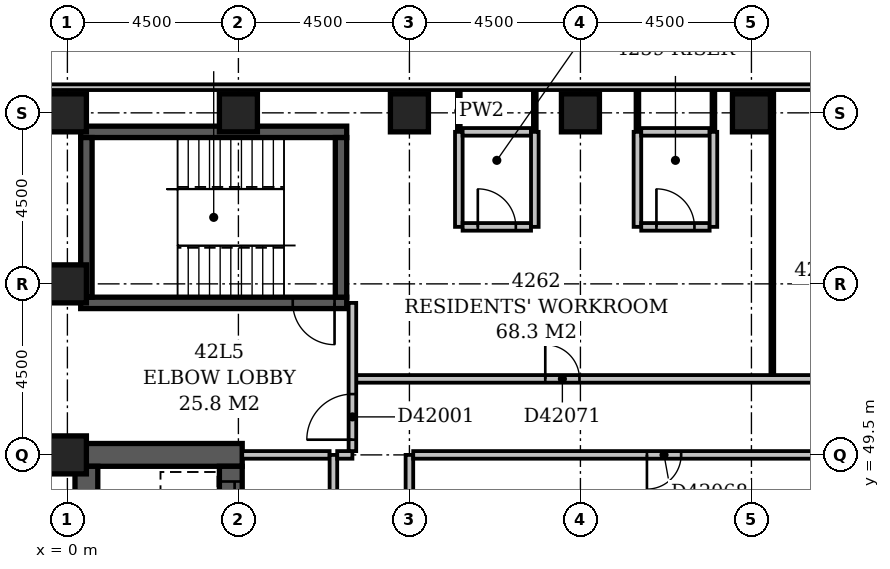
"""IFC4 building model, lengths in metres.
Left out: names, types, materials, properties, quantities, classifications, styles, units other than length and angle.
Written with IfcOpenShell. Run it as: python <this file> out.ifc"""

import sys

from ifc_helpers import new_model, si_unit, direction, frame, frame_2d, origin, origin_2d, place, context, subcontext, project, spatial, rectangle, extrude, element, fill, save


model = new_model("IFC4")
c1 = context("Model", 3, precision=1e-05, world=origin(), true_north=direction((0.0, 1.0)))
c2 = subcontext(c1, "Body", "Model", "MODEL_VIEW")
j1 = project(units=[si_unit("LENGTHUNIT", "METRE"), si_unit("PLANEANGLEUNIT", "RADIAN")], contexts=[c1])
p1 = place(None, origin())
s1 = spatial("IfcSite", under=j1, at=p1, CompositionType="ELEMENT")
p2 = place(p1, origin())
s2 = spatial("IfcBuilding", under=s1, at=p2, CompositionType="ELEMENT")
p3 = place(p2, frame((0.0, 0.0, 166.4)))
s3 = spatial("IfcBuildingStorey", under=s2, at=p3, CompositionType="ELEMENT", Elevation=166.4)
p4 = place(p3, frame((0.2, 49.5, -0.3), z_axis=(0.0, 0.0, 1.0), x_axis=(1.0, 0.0, 0.0)))
e1 = element("IfcWall", 1, at=p4, inside=s3, PredefinedType="SHEAR", context=c2, shape_type="SweptSolid", body=[
    extrude(rectangle(XDim=4.4, YDim=0.6, at=frame_2d((2.2, 0.0))), origin(), (0.0, 0.0, 1.0), 3.6),
])
p5 = place(p3, frame((0.35, 53.5, -0.3), z_axis=(0.0, 0.0, 1.0), x_axis=(1.0, 0.0, 0.0)))
e2 = element("IfcWall", 2, at=p5, inside=s3, PredefinedType="SHEAR", context=c2, shape_type="SweptSolid", body=[
    extrude(rectangle(XDim=7.0, YDim=0.3, at=frame_2d((3.5, 0.0))), origin(), (0.0, 0.0, 1.0), 3.6),
])
p6 = place(p5, frame((5.58, 0.0, 0.3)))
e3 = element("IfcOpeningElement", 3, at=p6, cuts=e2, PredefinedType="OPENING", context=c2, shape_type="SweptSolid", body=[
    extrude(rectangle(XDim=1.1, YDim=2.1, at=frame_2d((0.55, 1.05))), frame((0.0, 0.162, 0.0), z_axis=(0.0, -1.0, 0.0), x_axis=(1.0, 0.0, 0.0)), (0.0, 0.0, 1.0), 0.324),
])
p7 = place(p3, frame((0.35, 58.0, -0.3), z_axis=(0.0, 0.0, 1.0), x_axis=(1.0, 0.0, 0.0)))
e4 = element("IfcWall", 4, at=p7, inside=s3, PredefinedType="SHEAR", context=c2, shape_type="SweptSolid", body=[
    extrude(rectangle(XDim=7.0, YDim=0.3, at=frame_2d((3.5, 0.0))), origin(), (0.0, 0.0, 1.0), 3.6),
])
p8 = place(p3, frame((0.5, 27.15, -0.3), z_axis=(0.0, 0.0, 1.0), x_axis=(0.0, 1.0, 0.0)))
e5 = element("IfcWall", 5, at=p8, inside=s3, PredefinedType="SHEAR", context=c2, shape_type="SweptSolid", body=[
    extrude(rectangle(XDim=22.05, YDim=0.6, at=frame_2d((11.025, 0.0))), origin(), (0.0, 0.0, 1.0), 3.6),
])
p9 = place(p3, frame((0.5, 53.65, -0.3), z_axis=(0.0, 0.0, 1.0), x_axis=(0.0, 1.0, 0.0)))
e6 = element("IfcWall", 6, at=p9, inside=s3, PredefinedType="SHEAR", context=c2, shape_type="SweptSolid", body=[
    extrude(rectangle(XDim=4.2, YDim=0.3, at=frame_2d((2.1, 0.0))), origin(), (0.0, 0.0, 1.0), 3.6),
])
p10 = place(p3, frame((4.3, 27.15, -0.3), z_axis=(0.0, 0.0, 1.0), x_axis=(0.0, 1.0, 0.0)))
e7 = element("IfcWall", 7, at=p10, inside=s3, PredefinedType="SHEAR", context=c2, shape_type="SweptSolid", body=[
    extrude(rectangle(XDim=22.05, YDim=0.6, at=frame_2d((11.025, 0.0))), origin(), (0.0, 0.0, 1.0), 3.6),
])
p11 = place(p10, frame((3.05, 0.0, 0.3)))
e8 = element("IfcOpeningElement", 8, at=p11, cuts=e7, PredefinedType="OPENING", context=c2, shape_type="SweptSolid", body=[
    extrude(rectangle(XDim=1.1, YDim=2.1, at=frame_2d((0.55, 1.05))), frame((0.0, 0.312, 0.0), z_axis=(0.0, -1.0, 0.0), x_axis=(1.0, 0.0, 0.0)), (0.0, 0.0, 1.0), 0.624),
])
p12 = place(p10, frame((0.55, 0.0, 0.3)))
e9 = element("IfcOpeningElement", 9, at=p12, cuts=e7, PredefinedType="OPENING", context=c2, shape_type="SweptSolid", body=[
    extrude(rectangle(XDim=1.1, YDim=2.1, at=frame_2d((0.55, 1.05))), frame((0.0, 0.312, 0.0), z_axis=(0.0, -1.0, 0.0), x_axis=(1.0, 0.0, 0.0)), (0.0, 0.0, 1.0), 0.624),
])
p13 = place(p10, frame((20.55, 0.0, 0.3)))
e10 = element("IfcOpeningElement", 10, at=p13, cuts=e7, PredefinedType="OPENING", context=c2, shape_type="SweptSolid", body=[
    extrude(rectangle(XDim=1.1, YDim=2.1, at=frame_2d((0.55, 1.05))), frame((0.0, 0.312, 0.0), z_axis=(0.0, -1.0, 0.0), x_axis=(1.0, 0.0, 0.0)), (0.0, 0.0, 1.0), 0.624),
])
p14 = place(p10, frame((18.05, 0.0, 0.3)))
e11 = element("IfcOpeningElement", 11, at=p14, cuts=e7, PredefinedType="OPENING", context=c2, shape_type="SweptSolid", body=[
    extrude(rectangle(XDim=1.1, YDim=2.1, at=frame_2d((0.55, 1.05))), frame((0.0, 0.312, 0.0), z_axis=(0.0, -1.0, 0.0), x_axis=(1.0, 0.0, 0.0)), (0.0, 0.0, 1.0), 0.624),
])
p15 = place(p10, frame((15.55, 0.0, 0.3)))
e12 = element("IfcOpeningElement", 12, at=p15, cuts=e7, PredefinedType="OPENING", context=c2, shape_type="SweptSolid", body=[
    extrude(rectangle(XDim=1.1, YDim=2.1, at=frame_2d((0.55, 1.05))), frame((0.0, 0.312, 0.0), z_axis=(0.0, -1.0, 0.0), x_axis=(1.0, 0.0, 0.0)), (0.0, 0.0, 1.0), 0.624),
])
p16 = place(p10, frame((13.05, 0.0, 0.3)))
e13 = element("IfcOpeningElement", 13, at=p16, cuts=e7, PredefinedType="OPENING", context=c2, shape_type="SweptSolid", body=[
    extrude(rectangle(XDim=1.1, YDim=2.1, at=frame_2d((0.55, 1.05))), frame((0.0, 0.312, 0.0), z_axis=(0.0, -1.0, 0.0), x_axis=(1.0, 0.0, 0.0)), (0.0, 0.0, 1.0), 0.624),
])
p17 = place(p10, frame((10.55, 0.0, 0.3)))
e14 = element("IfcOpeningElement", 14, at=p17, cuts=e7, PredefinedType="OPENING", context=c2, shape_type="SweptSolid", body=[
    extrude(rectangle(XDim=1.1, YDim=2.1, at=frame_2d((0.55, 1.05))), frame((0.0, 0.312, 0.0), z_axis=(0.0, -1.0, 0.0), x_axis=(1.0, 0.0, 0.0)), (0.0, 0.0, 1.0), 0.624),
])
p18 = place(p10, frame((8.05, 0.0, 0.3)))
e15 = element("IfcOpeningElement", 15, at=p18, cuts=e7, PredefinedType="OPENING", context=c2, shape_type="SweptSolid", body=[
    extrude(rectangle(XDim=1.1, YDim=2.1, at=frame_2d((0.55, 1.05))), frame((0.0, 0.312, 0.0), z_axis=(0.0, -1.0, 0.0), x_axis=(1.0, 0.0, 0.0)), (0.0, 0.0, 1.0), 0.624),
])
p19 = place(p10, frame((5.55, 0.0, 0.3)))
e16 = element("IfcOpeningElement", 16, at=p19, cuts=e7, PredefinedType="OPENING", context=c2, shape_type="SweptSolid", body=[
    extrude(rectangle(XDim=1.1, YDim=2.1, at=frame_2d((0.55, 1.05))), frame((0.0, 0.312, 0.0), z_axis=(0.0, -1.0, 0.0), x_axis=(1.0, 0.0, 0.0)), (0.0, 0.0, 1.0), 0.624),
])
p20 = place(p3, frame((7.2, 53.65, -0.3), z_axis=(0.0, 0.0, 1.0), x_axis=(0.0, 1.0, 0.0)))
e17 = element("IfcWall", 17, at=p20, inside=s3, PredefinedType="SHEAR", context=c2, shape_type="SweptSolid", body=[
    extrude(rectangle(XDim=4.2, YDim=0.3, at=frame_2d((2.1, 0.0))), origin(), (0.0, 0.0, 1.0), 3.6),
])
for number, where, z_axis, x_axis in (
    (18, (0.0, 49.5, -0.3), (0.0, 0.0, 1.0), (1.0, 0.0, 0.0)),
    (19, (0.0, 54.0, -0.3), (0.0, 0.0, 1.0), (1.0, 0.0, 0.0)),
    (20, (0.0, 58.5, -0.3), (0.0, 0.0, 1.0), (1.0, 0.0, 0.0)),
    (21, (4.5, 58.5, -0.3), (0.0, 0.0, 1.0), (1.0, 0.0, 0.0)),
    (22, (9.0, 58.5, -0.3), (0.0, 0.0, 1.0), (1.0, 0.0, 0.0)),
    (23, (13.5, 58.5, -0.3), (0.0, 0.0, 1.0), (1.0, 0.0, 0.0)),
    (24, (18.0, 58.5, -0.3), (0.0, 0.0, 1.0), (1.0, 0.0, 0.0)),
):
    element("IfcColumn", number, at=place(p3, frame(where, z_axis=z_axis, x_axis=x_axis)), inside=s3, PredefinedType="COLUMN", context=c2, shape_type="SweptSolid", body=[
        extrude(rectangle(XDim=1.0, YDim=1.0, at=origin_2d()), origin(), (0.0, 0.0, 1.0), 3.6),
    ])
p21 = place(p3, frame((68.1, 59.175, 0.0), z_axis=(0.0, 0.0, 1.0), x_axis=(-1.0, 0.0, 0.0)))
e25 = element("IfcWall", 25, at=p21, inside=s3, PredefinedType="STANDARD", context=c2, shape_type="SweptSolid", body=[
    extrude(rectangle(XDim=68.85, YDim=0.15, at=frame_2d((34.425, 0.0))), origin(), (0.0, 0.0, 1.0), 2.7),
])
p22 = place(p21, frame((1.65, 0.0, 0.6)))
e26 = element("IfcOpeningElement", 26, at=p22, cuts=e25, PredefinedType="OPENING", context=c2, shape_type="SweptSolid", body=[
    extrude(rectangle(XDim=2.4, YDim=1.8, at=frame_2d((1.2, 0.9))), frame((0.0, 0.087, 0.0), z_axis=(0.0, -1.0, 0.0), x_axis=(1.0, 0.0, 0.0)), (0.0, 0.0, 1.0), 0.174),
])
p23 = place(p21, frame((6.15, 0.0, 0.6)))
e27 = element("IfcOpeningElement", 27, at=p23, cuts=e25, PredefinedType="OPENING", context=c2, shape_type="SweptSolid", body=[
    extrude(rectangle(XDim=2.4, YDim=1.8, at=frame_2d((1.2, 0.9))), frame((0.0, 0.087, 0.0), z_axis=(0.0, -1.0, 0.0), x_axis=(1.0, 0.0, 0.0)), (0.0, 0.0, 1.0), 0.174),
])
p24 = place(p21, frame((19.65, 0.0, 0.6)))
e28 = element("IfcOpeningElement", 28, at=p24, cuts=e25, PredefinedType="OPENING", context=c2, shape_type="SweptSolid", body=[
    extrude(rectangle(XDim=2.4, YDim=1.8, at=frame_2d((1.2, 0.9))), frame((0.0, 0.087, 0.0), z_axis=(0.0, -1.0, 0.0), x_axis=(1.0, 0.0, 0.0)), (0.0, 0.0, 1.0), 0.174),
])
p25 = place(p3, frame((7.0, 34.6, 0.0), z_axis=(0.0, 0.0, 1.0), x_axis=(0.0, 1.0, 0.0)))
e29 = element("IfcWall", 29, at=p25, inside=s3, PredefinedType="PARTITIONING", context=c2, shape_type="SweptSolid", body=[
    extrude(rectangle(XDim=14.9, YDim=0.2, at=frame_2d((7.45, 0.0))), origin(), (0.0, 0.0, 1.0), 3.3),
])
p26 = place(p25, frame((2.8, 0.0, 0.0)))
e30 = element("IfcOpeningElement", 30, at=p26, cuts=e29, PredefinedType="OPENING", context=c2, shape_type="SweptSolid", body=[
    extrude(rectangle(XDim=1.2, YDim=2.1, at=frame_2d((0.6, 1.05))), frame((0.0, 0.112, 0.0), z_axis=(0.0, -1.0, 0.0), x_axis=(1.0, 0.0, 0.0)), (0.0, 0.0, 1.0), 0.224),
])
p27 = place(p25, frame((9.8, 0.0, 0.0)))
e31 = element("IfcOpeningElement", 31, at=p27, cuts=e29, PredefinedType="OPENING", context=c2, shape_type="SweptSolid", body=[
    extrude(rectangle(XDim=1.2, YDim=2.1, at=frame_2d((0.6, 1.05))), frame((0.0, 0.112, 0.0), z_axis=(0.0, -1.0, 0.0), x_axis=(1.0, 0.0, 0.0)), (0.0, 0.0, 1.0), 0.224),
])
p28 = place(p3, frame((4.6, 49.5, 0.0), z_axis=(0.0, 0.0, 1.0), x_axis=(1.0, 0.0, 0.0)))
e32 = element("IfcWall", 32, at=p28, inside=s3, PredefinedType="PARTITIONING", context=c2, shape_type="SweptSolid", body=[
    extrude(rectangle(XDim=2.3, YDim=0.2, at=frame_2d((1.15, 0.0))), origin(), (0.0, 0.0, 1.0), 3.3),
])
p29 = place(p3, frame((7.1, 49.5, 0.0), z_axis=(0.0, 0.0, 1.0), x_axis=(1.0, 0.0, 0.0)))
e33 = element("IfcWall", 33, at=p29, inside=s3, PredefinedType="PARTITIONING", context=c2, shape_type="SweptSolid", body=[
    extrude(rectangle(XDim=0.4, YDim=0.2, at=frame_2d((0.2, 0.0))), origin(), (0.0, 0.0, 1.0), 3.3),
])
p30 = place(p3, frame((7.5, 49.6, 0.0), z_axis=(0.0, 0.0, 1.0), x_axis=(0.0, 1.0, 0.0)))
e34 = element("IfcWall", 34, at=p30, inside=s3, PredefinedType="PARTITIONING", context=c2, shape_type="SweptSolid", body=[
    extrude(rectangle(XDim=3.9, YDim=0.2, at=frame_2d((1.95, 0.0))), origin(), (0.0, 0.0, 1.0), 3.3),
])
p31 = place(p30, frame((0.3, 0.0, 0.0)))
e35 = element("IfcOpeningElement", 35, at=p31, cuts=e34, PredefinedType="OPENING", context=c2, shape_type="SweptSolid", body=[
    extrude(rectangle(XDim=1.2, YDim=2.1, at=frame_2d((0.6, 1.05))), frame((0.0, 0.112, 0.0), z_axis=(0.0, -1.0, 0.0), x_axis=(1.0, 0.0, 0.0)), (0.0, 0.0, 1.0), 0.224),
])
p32 = place(p3, frame((9.0, 34.75, 0.0), z_axis=(0.0, 0.0, 1.0), x_axis=(0.0, 1.0, 0.0)))
e36 = element("IfcWall", 36, at=p32, inside=s3, PredefinedType="PARTITIONING", context=c2, shape_type="SweptSolid", body=[
    extrude(rectangle(XDim=14.75, YDim=0.2, at=frame_2d((7.375, 0.0))), origin(), (0.0, 0.0, 1.0), 3.3),
])
p33 = place(p32, frame((3.0, 0.0, 0.0)))
e37 = element("IfcOpeningElement", 37, at=p33, cuts=e36, PredefinedType="OPENING", context=c2, shape_type="SweptSolid", body=[
    extrude(rectangle(XDim=0.9, YDim=2.1, at=frame_2d((0.45, 1.05))), frame((0.0, 0.112, 0.0), z_axis=(0.0, -1.0, 0.0), x_axis=(1.0, 0.0, 0.0)), (0.0, 0.0, 1.0), 0.224),
])
p34 = place(p32, frame((7.5, 0.0, 0.0)))
e38 = element("IfcOpeningElement", 38, at=p34, cuts=e36, PredefinedType="OPENING", context=c2, shape_type="SweptSolid", body=[
    extrude(rectangle(XDim=0.9, YDim=2.1, at=frame_2d((0.45, 1.05))), frame((0.0, 0.112, 0.0), z_axis=(0.0, -1.0, 0.0), x_axis=(1.0, 0.0, 0.0)), (0.0, 0.0, 1.0), 0.224),
])
p35 = place(p3, frame((9.1, 49.5, 0.0), z_axis=(0.0, 0.0, 1.0), x_axis=(1.0, 0.0, 0.0)))
e39 = element("IfcWall", 39, at=p35, inside=s3, PredefinedType="PARTITIONING", context=c2, shape_type="SweptSolid", body=[
    extrude(rectangle(XDim=32.55, YDim=0.2, at=frame_2d((16.275, 0.0))), origin(), (0.0, 0.0, 1.0), 3.3),
])
p36 = place(p35, frame((20.6, 0.0, 0.0)))
e40 = element("IfcOpeningElement", 40, at=p36, cuts=e39, PredefinedType="OPENING", context=c2, shape_type="SweptSolid", body=[
    extrude(rectangle(XDim=1.0, YDim=2.1, at=frame_2d((0.5, 1.05))), frame((0.0, 0.112, 0.0), z_axis=(0.0, -1.0, 0.0), x_axis=(1.0, 0.0, 0.0)), (0.0, 0.0, 1.0), 0.224),
])
p37 = place(p35, frame((6.15, 0.0, 0.0)))
e41 = element("IfcOpeningElement", 41, at=p37, cuts=e39, PredefinedType="OPENING", context=c2, shape_type="SweptSolid", body=[
    extrude(rectangle(XDim=0.9, YDim=2.1, at=frame_2d((0.45, 1.05))), frame((0.0, 0.112, 0.0), z_axis=(0.0, -1.0, 0.0), x_axis=(1.0, 0.0, 0.0)), (0.0, 0.0, 1.0), 0.224),
])
p38 = place(p3, frame((7.6, 51.5, 0.0), z_axis=(0.0, 0.0, 1.0), x_axis=(1.0, 0.0, 0.0)))
e42 = element("IfcWall", 42, at=p38, inside=s3, PredefinedType="PARTITIONING", context=c2, shape_type="SweptSolid", body=[
    extrude(rectangle(XDim=15.3, YDim=0.2, at=frame_2d((7.65, 0.0))), origin(), (0.0, 0.0, 1.0), 3.3),
])
p39 = place(p38, frame((4.975, 0.0, 0.0)))
e43 = element("IfcOpeningElement", 43, at=p39, cuts=e42, PredefinedType="OPENING", context=c2, shape_type="SweptSolid", body=[
    extrude(rectangle(XDim=0.9, YDim=2.1, at=frame_2d((0.45, 1.05))), frame((0.0, 0.112, 0.0), z_axis=(0.0, -1.0, 0.0), x_axis=(1.0, 0.0, 0.0)), (0.0, 0.0, 1.0), 0.224),
])
p40 = place(p38, frame((12.725, 0.0, 0.0)))
e44 = element("IfcOpeningElement", 44, at=p40, cuts=e42, PredefinedType="OPENING", context=c2, shape_type="SweptSolid", body=[
    extrude(rectangle(XDim=0.9, YDim=2.1, at=frame_2d((0.45, 1.05))), frame((0.0, 0.112, 0.0), z_axis=(0.0, -1.0, 0.0), x_axis=(1.0, 0.0, 0.0)), (0.0, 0.0, 1.0), 0.224),
])
p41 = place(p3, frame((18.55, 51.6, 0.0), z_axis=(0.0, 0.0, 1.0), x_axis=(0.0, 1.0, 0.0)))
e45 = element("IfcWall", 45, at=p41, inside=s3, PredefinedType="PARTITIONING", context=c2, shape_type="SweptSolid", body=[
    extrude(rectangle(XDim=7.5, YDim=0.1, at=frame_2d((3.75, 0.0))), origin(), (0.0, 0.0, 1.0), 3.3),
])
p42 = place(p3, frame((10.3, 55.5, 0.0), z_axis=(0.0, 0.0, 1.0), x_axis=(0.0, 1.0, 0.0)))
e46 = element("IfcWall", 46, at=p42, inside=s3, PredefinedType="PARTITIONING", context=c2, shape_type="SweptSolid", body=[
    extrude(rectangle(XDim=2.5, YDim=0.2, at=frame_2d((1.25, 0.0))), origin(), (0.0, 0.0, 1.0), 3.3),
])
p43 = place(p3, frame((10.4, 55.5, 0.0), z_axis=(0.0, 0.0, 1.0), x_axis=(1.0, 0.0, 0.0)))
e47 = element("IfcWall", 47, at=p43, inside=s3, PredefinedType="PARTITIONING", context=c2, shape_type="SweptSolid", body=[
    extrude(rectangle(XDim=1.8, YDim=0.2, at=frame_2d((0.9, 0.0))), origin(), (0.0, 0.0, 1.0), 3.3),
])
p44 = place(p43, frame((0.4, 0.0, 0.0)))
e48 = element("IfcOpeningElement", 48, at=p44, cuts=e47, PredefinedType="OPENING", context=c2, shape_type="SweptSolid", body=[
    extrude(rectangle(XDim=1.0, YDim=2.1, at=frame_2d((0.5, 1.05))), frame((0.0, 0.112, 0.0), z_axis=(0.0, -1.0, 0.0), x_axis=(1.0, 0.0, 0.0)), (0.0, 0.0, 1.0), 0.224),
])
for number, where, z_axis, x_axis in (
    (49, (12.3, 55.5, 0.0), (0.0, 0.0, 1.0), (0.0, 1.0, 0.0)),
    (50, (15.0, 55.5, 0.0), (0.0, 0.0, 1.0), (0.0, 1.0, 0.0)),
):
    element("IfcWall", number, at=place(p3, frame(where, z_axis=z_axis, x_axis=x_axis)), inside=s3, PredefinedType="PARTITIONING", context=c2, shape_type="SweptSolid", body=[
        extrude(rectangle(XDim=2.5, YDim=0.2, at=frame_2d((1.25, 0.0))), origin(), (0.0, 0.0, 1.0), 3.3),
    ])
p45 = place(p3, frame((15.1, 55.5, 0.0), z_axis=(0.0, 0.0, 1.0), x_axis=(1.0, 0.0, 0.0)))
e51 = element("IfcWall", 51, at=p45, inside=s3, PredefinedType="PARTITIONING", context=c2, shape_type="SweptSolid", body=[
    extrude(rectangle(XDim=1.8, YDim=0.2, at=frame_2d((0.9, 0.0))), origin(), (0.0, 0.0, 1.0), 3.3),
])
p46 = place(p45, frame((0.4, 0.0, 0.0)))
e52 = element("IfcOpeningElement", 52, at=p46, cuts=e51, PredefinedType="OPENING", context=c2, shape_type="SweptSolid", body=[
    extrude(rectangle(XDim=1.0, YDim=2.1, at=frame_2d((0.5, 1.05))), frame((0.0, 0.112, 0.0), z_axis=(0.0, -1.0, 0.0), x_axis=(1.0, 0.0, 0.0)), (0.0, 0.0, 1.0), 0.224),
])
p47 = place(p3, frame((17.0, 55.5, 0.0), z_axis=(0.0, 0.0, 1.0), x_axis=(0.0, 1.0, 0.0)))
e53 = element("IfcWall", 53, at=p47, inside=s3, PredefinedType="PARTITIONING", context=c2, shape_type="SweptSolid", body=[
    extrude(rectangle(XDim=2.5, YDim=0.2, at=frame_2d((1.25, 0.0))), origin(), (0.0, 0.0, 1.0), 3.3),
])
p48 = place(p3, frame((10.3, 58.0, 0.0), z_axis=(0.0, 0.0, 1.0), x_axis=(0.0, 1.0, 0.0)))
e54 = element("IfcWall", 54, at=p48, inside=s3, PredefinedType="PARTITIONING", context=c2, shape_type="SweptSolid", body=[
    extrude(rectangle(XDim=1.1, YDim=0.1, at=frame_2d((0.55, 0.0))), origin(), (0.0, 0.0, 1.0), 3.3),
])
p49 = place(p3, frame((10.4, 58.0, 0.0), z_axis=(0.0, 0.0, 1.0), x_axis=(1.0, 0.0, 0.0)))
e55 = element("IfcWall", 55, at=p49, inside=s3, PredefinedType="PARTITIONING", context=c2, shape_type="SweptSolid", body=[
    extrude(rectangle(XDim=1.8, YDim=0.2, at=frame_2d((0.9, 0.0))), origin(), (0.0, 0.0, 1.0), 3.3),
])
for number, where, z_axis, x_axis in (
    (56, (12.3, 58.0, 0.0), (0.0, 0.0, 1.0), (0.0, 1.0, 0.0)),
    (57, (15.0, 58.0, 0.0), (0.0, 0.0, 1.0), (0.0, 1.0, 0.0)),
):
    element("IfcWall", number, at=place(p3, frame(where, z_axis=z_axis, x_axis=x_axis)), inside=s3, PredefinedType="PARTITIONING", context=c2, shape_type="SweptSolid", body=[
        extrude(rectangle(XDim=1.1, YDim=0.1, at=frame_2d((0.55, 0.0))), origin(), (0.0, 0.0, 1.0), 3.3),
    ])
p50 = place(p3, frame((15.1, 58.0, 0.0), z_axis=(0.0, 0.0, 1.0), x_axis=(1.0, 0.0, 0.0)))
e58 = element("IfcWall", 58, at=p50, inside=s3, PredefinedType="PARTITIONING", context=c2, shape_type="SweptSolid", body=[
    extrude(rectangle(XDim=1.8, YDim=0.2, at=frame_2d((0.9, 0.0))), origin(), (0.0, 0.0, 1.0), 3.3),
])
p51 = place(p3, frame((17.0, 58.0, 0.0), z_axis=(0.0, 0.0, 1.0), x_axis=(0.0, 1.0, 0.0)))
e59 = element("IfcWall", 59, at=p51, inside=s3, PredefinedType="PARTITIONING", context=c2, shape_type="SweptSolid", body=[
    extrude(rectangle(XDim=1.1, YDim=0.1, at=frame_2d((0.55, 0.0))), origin(), (0.0, 0.0, 1.0), 3.3),
])
p52 = place(p31, origin())
e60 = element("IfcDoor", 60, at=p52, inside=s3, OperationType="SINGLE_SWING_LEFT", PredefinedType="DOOR", context=c2, shape_type="SweptSolid", body=[
    extrude(rectangle(XDim=1.2, YDim=2.1, at=frame_2d((0.6, 1.05))), frame((0.0, 0.025, 0.0), z_axis=(0.0, -1.0, 0.0), x_axis=(1.0, 0.0, 0.0)), (0.0, 0.0, 1.0), 0.05),
])
fill(e35, e60)
p53 = place(p13, origin())
e61 = element("IfcDoor", 61, at=p53, inside=s3, OperationType="SLIDING_TO_LEFT", PredefinedType="DOOR", context=c2, shape_type="SweptSolid", body=[
    extrude(rectangle(XDim=1.1, YDim=2.1, at=frame_2d((0.55, 1.05))), frame((0.0, 0.025, 0.0), z_axis=(0.0, -1.0, 0.0), x_axis=(1.0, 0.0, 0.0)), (0.0, 0.0, 1.0), 0.05),
])
fill(e10, e61)
p54 = place(p6, origin())
e62 = element("IfcDoor", 62, at=p54, inside=s3, OperationType="SINGLE_SWING_RIGHT", PredefinedType="DOOR", context=c2, shape_type="SweptSolid", body=[
    extrude(rectangle(XDim=1.1, YDim=2.1, at=frame_2d((0.55, 1.05))), frame((0.0, 0.025, 0.0), z_axis=(0.0, -1.0, 0.0), x_axis=(1.0, 0.0, 0.0)), (0.0, 0.0, 1.0), 0.05),
])
fill(e3, e62)
p55 = place(p37, frame((0.9, 0.0, 0.0), z_axis=(0.0, 0.0, 1.0), x_axis=(-1.0, 0.0, 0.0)))
e63 = element("IfcDoor", 63, at=p55, inside=s3, OperationType="SINGLE_SWING_RIGHT", PredefinedType="DOOR", context=c2, shape_type="SweptSolid", body=[
    extrude(rectangle(XDim=0.9, YDim=2.1, at=frame_2d((0.45, 1.05))), frame((0.0, 0.025, 0.0), z_axis=(0.0, -1.0, 0.0), x_axis=(1.0, 0.0, 0.0)), (0.0, 0.0, 1.0), 0.05),
])
fill(e41, e63)
p56 = place(p39, origin())
e64 = element("IfcDoor", 64, at=p56, inside=s3, OperationType="SINGLE_SWING_LEFT", PredefinedType="DOOR", context=c2, shape_type="SweptSolid", body=[
    extrude(rectangle(XDim=0.9, YDim=2.1, at=frame_2d((0.45, 1.05))), frame((0.0, 0.025, 0.0), z_axis=(0.0, -1.0, 0.0), x_axis=(1.0, 0.0, 0.0)), (0.0, 0.0, 1.0), 0.05),
])
fill(e43, e64)
p57 = place(p44, origin())
e65 = element("IfcDoor", 65, at=p57, inside=s3, OperationType="SINGLE_SWING_LEFT", PredefinedType="DOOR", context=c2, shape_type="SweptSolid", body=[
    extrude(rectangle(XDim=1.0, YDim=2.1, at=frame_2d((0.5, 1.05))), frame((0.0, 0.025, 0.0), z_axis=(0.0, -1.0, 0.0), x_axis=(1.0, 0.0, 0.0)), (0.0, 0.0, 1.0), 0.05),
])
fill(e48, e65)
p58 = place(p46, origin())
e66 = element("IfcDoor", 66, at=p58, inside=s3, OperationType="SINGLE_SWING_LEFT", PredefinedType="DOOR", context=c2, shape_type="SweptSolid", body=[
    extrude(rectangle(XDim=1.0, YDim=2.1, at=frame_2d((0.5, 1.05))), frame((0.0, 0.025, 0.0), z_axis=(0.0, -1.0, 0.0), x_axis=(1.0, 0.0, 0.0)), (0.0, 0.0, 1.0), 0.05),
])
fill(e52, e66)
save(model, sys.argv[1])
